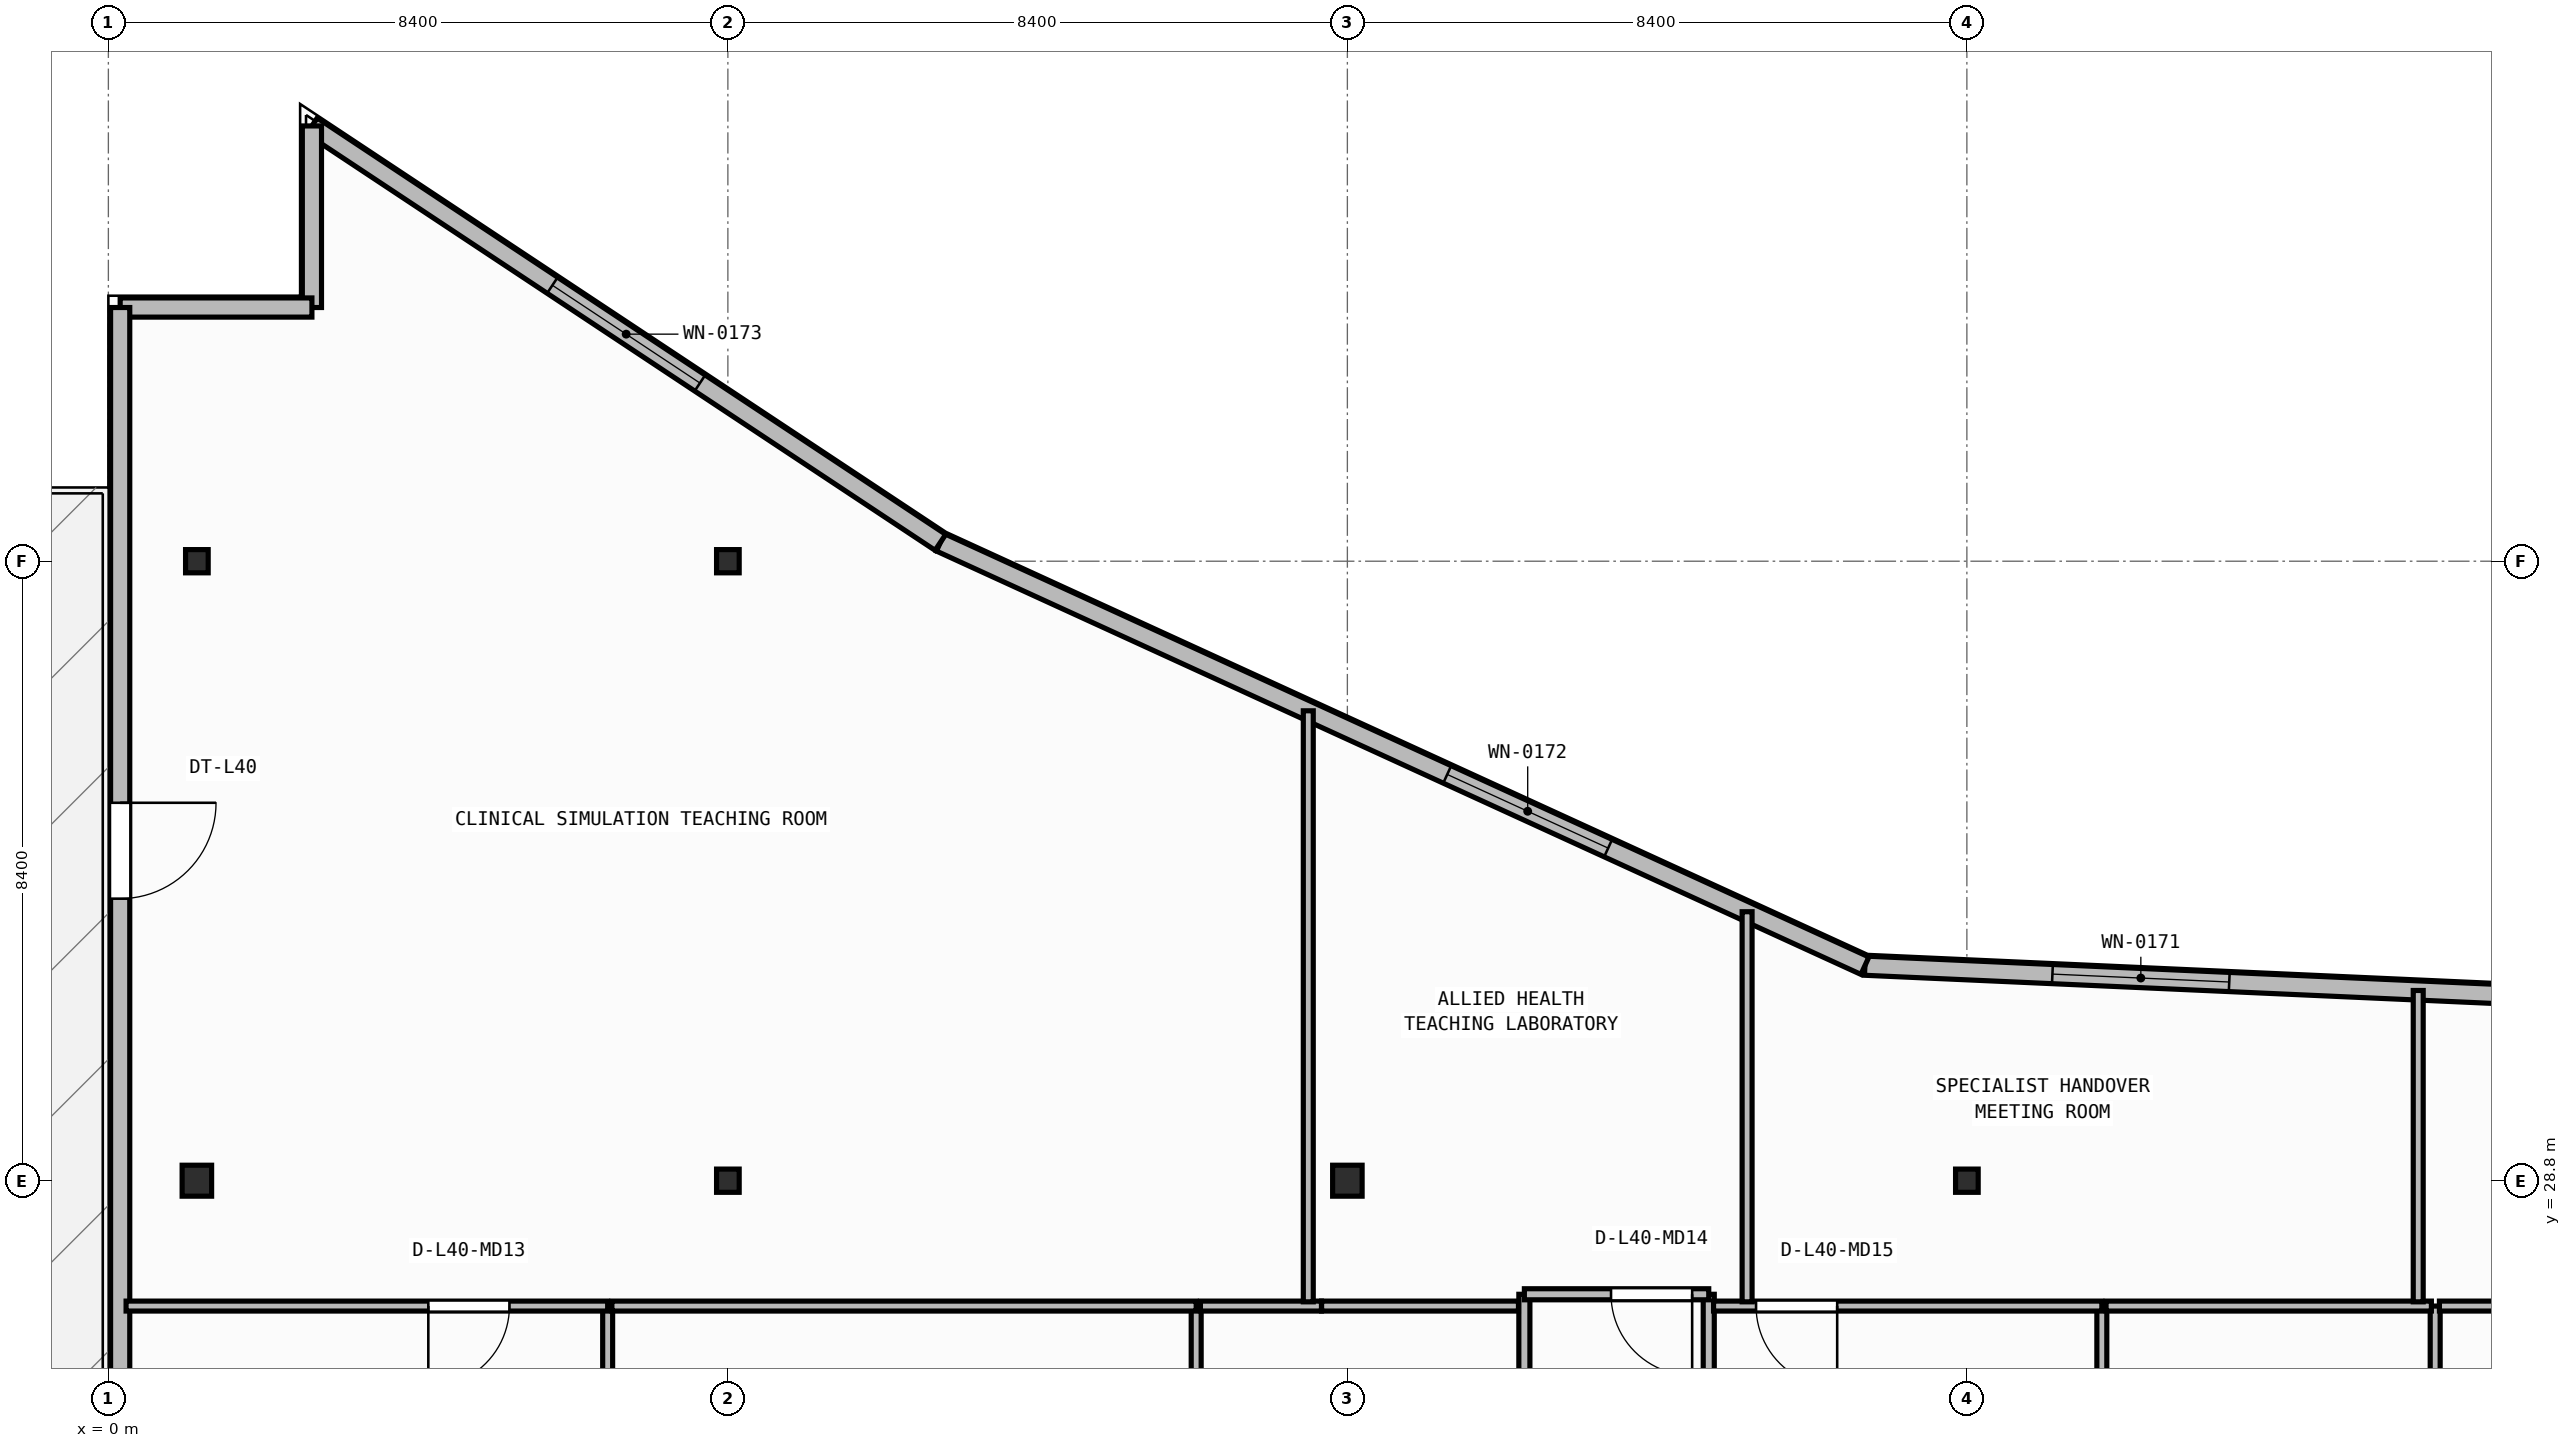
"""IFC4 building model, lengths in metres.
Left out: names, types, materials, properties, quantities, classifications, styles, units other than length and angle.
Written with IfcOpenShell. Run it as: python <this file> out.ifc"""

import sys

from ifc_helpers import new_model, si_unit, direction, frame, frame_2d, origin, origin_2d, place, context, subcontext, project, spatial, rectangle, i_section, extrude, element, fill, save


model = new_model("IFC4")
c1 = context("Model", 3, precision=1e-05, world=origin(), true_north=direction((0.0, 1.0)))
c2 = subcontext(c1, "Body", "Model", "MODEL_VIEW")
j1 = project(units=[si_unit("LENGTHUNIT", "METRE"), si_unit("PLANEANGLEUNIT", "RADIAN")], contexts=[c1])
p1 = place(None, origin())
s1 = spatial("IfcSite", under=j1, at=p1, CompositionType="ELEMENT")
p2 = place(p1, origin())
s2 = spatial("IfcBuilding", under=s1, at=p2, CompositionType="ELEMENT")
p3 = place(p2, frame((0.0, 0.0, 162.6)))
s3 = spatial("IfcBuildingStorey", under=s2, at=p3, CompositionType="ELEMENT", Elevation=162.6)
p4 = place(p3, frame((1.2, 28.8, 0.0), z_axis=(0.0, 0.0, 1.0), x_axis=(1.0, 0.0, 0.0)))
e1 = element("IfcColumn", 1, at=p4, inside=s3, PredefinedType="COLUMN", context=c2, shape_type="SweptSolid", body=[
    extrude(i_section(OverallWidth=0.4, OverallDepth=0.42, WebThickness=0.025, FlangeThickness=0.04, at=origin_2d()), origin(), (0.0, 0.0, 1.0), 3.95),
])
p5 = place(p3, frame((8.4, 28.8, 0.0), z_axis=(0.0, 0.0, 1.0), x_axis=(1.0, 0.0, 0.0)))
e2 = element("IfcColumn", 2, at=p5, inside=s3, PredefinedType="COLUMN", context=c2, shape_type="SweptSolid", body=[
    extrude(i_section(OverallWidth=0.307, OverallDepth=0.315, WebThickness=0.012, FlangeThickness=0.019, FilletRadius=0.017, at=origin_2d()), origin(), (0.0, 0.0, 1.0), 3.95),
])
p6 = place(p3, frame((16.8, 28.8, 0.0), z_axis=(0.0, 0.0, 1.0), x_axis=(1.0, 0.0, 0.0)))
e3 = element("IfcColumn", 3, at=p6, inside=s3, PredefinedType="COLUMN", context=c2, shape_type="SweptSolid", body=[
    extrude(i_section(OverallWidth=0.4, OverallDepth=0.42, WebThickness=0.025, FlangeThickness=0.04, at=origin_2d()), origin(), (0.0, 0.0, 1.0), 3.95),
])
for number, where, z_axis, x_axis in (
    (4, (25.2, 28.8, 0.0), (0.0, 0.0, 1.0), (1.0, 0.0, 0.0)),
    (5, (1.2, 37.2, 0.0), (0.0, 0.0, 1.0), (1.0, 0.0, 0.0)),
    (6, (8.4, 37.2, 0.0), (0.0, 0.0, 1.0), (1.0, 0.0, 0.0)),
):
    element("IfcColumn", number, at=place(p3, frame(where, z_axis=z_axis, x_axis=x_axis)), inside=s3, PredefinedType="COLUMN", context=c2, shape_type="SweptSolid", body=[
        extrude(i_section(OverallWidth=0.307, OverallDepth=0.315, WebThickness=0.012, FlangeThickness=0.019, FilletRadius=0.017, at=origin_2d()), origin(), (0.0, 0.0, 1.0), 3.95),
    ])
p7 = place(p3, frame((38.63, 31.052, 0.0), z_axis=(0.0, 0.0, 1.0), x_axis=(-0.998996592956, 0.044786239663, 0.0)))
e7 = element("IfcWall", 7, at=p7, inside=s3, PredefinedType="STANDARD", context=c2, shape_type="SweptSolid", body=[
    extrude(rectangle(XDim=14.827, YDim=0.26, at=frame_2d((7.414, 0.0))), origin(), (0.0, 0.0, 1.0), 3.71),
])
p8 = place(p7, frame((9.882, 0.0, 0.9)))
e8 = element("IfcOpeningElement", 8, at=p8, cuts=e7, PredefinedType="OPENING", context=c2, shape_type="SweptSolid", body=[
    extrude(rectangle(XDim=2.4, YDim=1.65, at=frame_2d((1.2, 0.825))), frame((0.0, 0.14, 0.0), z_axis=(0.0, -1.0, 0.0), x_axis=(1.0, 0.0, 0.0)), (0.0, 0.0, 1.0), 0.28),
])
p9 = place(p3, frame((23.818, 31.716, 0.0), z_axis=(0.0, 0.0, 1.0), x_axis=(-0.909209527513, 0.416338846471, 0.0)))
e9 = element("IfcWall", 9, at=p9, inside=s3, PredefinedType="STANDARD", context=c2, shape_type="SweptSolid", body=[
    extrude(rectangle(XDim=13.787, YDim=0.26, at=frame_2d((6.894, 0.0))), origin(), (0.0, 0.0, 1.0), 3.71),
])
p10 = place(p9, frame((3.829, 0.0, 0.9)))
e10 = element("IfcOpeningElement", 10, at=p10, cuts=e9, PredefinedType="OPENING", context=c2, shape_type="SweptSolid", body=[
    extrude(rectangle(XDim=2.4, YDim=1.65, at=frame_2d((1.2, 0.825))), frame((0.0, 0.14, 0.0), z_axis=(0.0, -1.0, 0.0), x_axis=(1.0, 0.0, 0.0)), (0.0, 0.0, 1.0), 0.28),
])
p11 = place(p3, frame((11.282, 37.456, 0.0), z_axis=(0.0, 0.0, 1.0), x_axis=(-0.833630474253, 0.552322580017, 0.0)))
e11 = element("IfcWall", 11, at=p11, inside=s3, PredefinedType="STANDARD", context=c2, shape_type="SweptSolid", body=[
    extrude(rectangle(XDim=10.223, YDim=0.26, at=frame_2d((5.111, 0.0))), origin(), (0.0, 0.0, 1.0), 3.71),
])
p12 = place(p11, frame((3.911, 0.0, 0.9)))
e12 = element("IfcOpeningElement", 12, at=p12, cuts=e11, PredefinedType="OPENING", context=c2, shape_type="SweptSolid", body=[
    extrude(rectangle(XDim=2.4, YDim=1.65, at=frame_2d((1.2, 0.825))), frame((0.0, 0.14, 0.0), z_axis=(0.0, -1.0, 0.0), x_axis=(1.0, 0.0, 0.0)), (0.0, 0.0, 1.0), 0.28),
])
p13 = place(p3, frame((2.76, 43.102, 0.0), z_axis=(0.0, 0.0, 1.0), x_axis=(0.0, -1.0, 0.0)))
e13 = element("IfcWall", 13, at=p13, inside=s3, PredefinedType="STANDARD", context=c2, shape_type="SweptSolid", body=[
    extrude(rectangle(XDim=2.462, YDim=0.26, at=frame_2d((1.231, 0.0))), origin(), (0.0, 0.0, 1.0), 3.71),
])
p14 = place(p3, frame((2.76, 40.64, 0.0), z_axis=(0.0, 0.0, 1.0), x_axis=(-1.0, 0.0, 0.0)))
e14 = element("IfcWall", 14, at=p14, inside=s3, PredefinedType="STANDARD", context=c2, shape_type="SweptSolid", body=[
    extrude(rectangle(XDim=2.6, YDim=0.26, at=frame_2d((1.3, 0.0))), origin(), (0.0, 0.0, 1.0), 3.71),
])
p15 = place(p3, frame((0.16, 40.64, 0.0), z_axis=(0.0, 0.0, 1.0), x_axis=(0.0, -1.0, 0.0)))
e15 = element("IfcWall", 15, at=p15, inside=s3, PredefinedType="STANDARD", context=c2, shape_type="SweptSolid", body=[
    extrude(rectangle(XDim=37.88, YDim=0.26, at=frame_2d((18.94, 0.0))), origin(), (0.0, 0.0, 1.0), 3.71),
])
p16 = place(p15, frame((6.716, 0.0, 0.0)))
e16 = element("IfcOpeningElement", 16, at=p16, cuts=e15, PredefinedType="OPENING", context=c2, shape_type="SweptSolid", body=[
    extrude(rectangle(XDim=1.3, YDim=2.15, at=frame_2d((0.65, 1.075))), frame((0.0, 0.14, 0.0), z_axis=(0.0, -1.0, 0.0), x_axis=(1.0, 0.0, 0.0)), (0.0, 0.0, 1.0), 0.28),
])
p17 = place(p3, frame((19.2, 27.26, 0.0), z_axis=(0.0, 0.0, 1.0), x_axis=(0.0, -1.0, 0.0)))
e17 = element("IfcWall", 17, at=p17, inside=s3, PredefinedType="PARTITIONING", context=c2, shape_type="SweptSolid", body=[
    extrude(rectangle(XDim=6.482, YDim=0.15, at=frame_2d((3.241, 0.0))), origin(), (0.0, 0.0, 1.0), 3.71),
])
p18 = place(p17, frame((2.068, 0.0, 0.0)))
e18 = element("IfcOpeningElement", 18, at=p18, cuts=e17, PredefinedType="OPENING", context=c2, shape_type="SweptSolid", body=[
    extrude(rectangle(XDim=1.1, YDim=2.1, at=frame_2d((0.55, 1.05))), frame((0.0, 0.085, 0.0), z_axis=(0.0, -1.0, 0.0), x_axis=(1.0, 0.0, 0.0)), (0.0, 0.0, 1.0), 0.17),
])
p19 = place(p3, frame((21.7, 23.784, 0.0), z_axis=(0.0, 0.0, 1.0), x_axis=(0.0, 1.0, 0.0)))
e19 = element("IfcWall", 19, at=p19, inside=s3, PredefinedType="PARTITIONING", context=c2, shape_type="SweptSolid", body=[
    extrude(rectangle(XDim=3.476, YDim=0.15, at=frame_2d((1.738, 0.0))), origin(), (0.0, 0.0, 1.0), 3.71),
])
p20 = place(p19, frame((1.188, 0.0, 0.0)))
e20 = element("IfcOpeningElement", 20, at=p20, cuts=e19, PredefinedType="OPENING", context=c2, shape_type="SweptSolid", body=[
    extrude(rectangle(XDim=1.1, YDim=2.1, at=frame_2d((0.55, 1.05))), frame((0.0, 0.085, 0.0), z_axis=(0.0, -1.0, 0.0), x_axis=(1.0, 0.0, 0.0)), (0.0, 0.0, 1.0), 0.17),
])
p21 = place(p3, frame((21.7, 27.26, 0.0), z_axis=(0.0, 0.0, 1.0), x_axis=(-1.0, 0.0, 0.0)))
e21 = element("IfcWall", 21, at=p21, inside=s3, PredefinedType="PARTITIONING", context=c2, shape_type="SweptSolid", body=[
    extrude(rectangle(XDim=2.5, YDim=0.15, at=frame_2d((1.25, 0.0))), origin(), (0.0, 0.0, 1.0), 3.71),
])
p22 = place(p21, frame((0.225, 0.0, 0.0)))
e22 = element("IfcOpeningElement", 22, at=p22, cuts=e21, PredefinedType="OPENING", context=c2, shape_type="SweptSolid", body=[
    extrude(rectangle(XDim=1.1, YDim=2.1, at=frame_2d((0.55, 1.05))), frame((0.0, 0.085, 0.0), z_axis=(0.0, -1.0, 0.0), x_axis=(1.0, 0.0, 0.0)), (0.0, 0.0, 1.0), 0.17),
])
p23 = place(p3, frame((6.77, 20.607, 0.0), z_axis=(0.0, 0.0, 1.0), x_axis=(0.0, 1.0, 0.0)))
e23 = element("IfcWall", 23, at=p23, inside=s3, PredefinedType="PARTITIONING", context=c2, shape_type="SweptSolid", body=[
    extrude(rectangle(XDim=6.493, YDim=0.135, at=frame_2d((3.246, 0.0))), origin(), (0.0, 0.0, 1.0), 3.71),
])
p24 = place(p3, frame((6.77, 27.1, 0.0), z_axis=(0.0, 0.0, 1.0), x_axis=(-1.0, 0.0, 0.0)))
e24 = element("IfcWall", 24, at=p24, inside=s3, PredefinedType="PARTITIONING", context=c2, shape_type="SweptSolid", body=[
    extrude(rectangle(XDim=6.53, YDim=0.135, at=frame_2d((3.265, 0.0))), origin(), (0.0, 0.0, 1.0), 3.71),
])
p25 = place(p24, frame((1.332, 0.0, 0.0)))
e25 = element("IfcOpeningElement", 25, at=p25, cuts=e24, PredefinedType="OPENING", context=c2, shape_type="SweptSolid", body=[
    extrude(rectangle(XDim=1.1, YDim=2.1, at=frame_2d((0.55, 1.05))), frame((0.0, 0.077, 0.0), z_axis=(0.0, -1.0, 0.0), x_axis=(1.0, 0.0, 0.0)), (0.0, 0.0, 1.0), 0.155),
])
p26 = place(p3, frame((14.75, 20.607, 0.0), z_axis=(0.0, 0.0, 1.0), x_axis=(0.0, 1.0, 0.0)))
e26 = element("IfcWall", 26, at=p26, inside=s3, PredefinedType="PARTITIONING", context=c2, shape_type="SweptSolid", body=[
    extrude(rectangle(XDim=6.493, YDim=0.135, at=frame_2d((3.246, 0.0))), origin(), (0.0, 0.0, 1.0), 3.71),
])
p27 = place(p3, frame((14.75, 27.1, 0.0), z_axis=(0.0, 0.0, 1.0), x_axis=(-1.0, 0.0, 0.0)))
e27 = element("IfcWall", 27, at=p27, inside=s3, PredefinedType="PARTITIONING", context=c2, shape_type="SweptSolid", body=[
    extrude(rectangle(XDim=7.923, YDim=0.135, at=frame_2d((3.961, 0.0))), origin(), (0.0, 0.0, 1.0), 3.71),
])
p28 = place(p3, frame((16.448, 27.1, 0.0), z_axis=(0.0, 0.0, 1.0), x_axis=(-1.0, 0.0, 0.0)))
e28 = element("IfcWall", 28, at=p28, inside=s3, PredefinedType="PARTITIONING", context=c2, shape_type="SweptSolid", body=[
    extrude(rectangle(XDim=1.641, YDim=0.135, at=frame_2d((0.82, 0.0))), origin(), (0.0, 0.0, 1.0), 3.71),
])
p29 = place(p3, frame((19.12, 27.1, 0.0), z_axis=(0.0, 0.0, 1.0), x_axis=(-1.0, 0.0, 0.0)))
e29 = element("IfcWall", 29, at=p29, inside=s3, PredefinedType="PARTITIONING", context=c2, shape_type="SweptSolid", body=[
    extrude(rectangle(XDim=2.67, YDim=0.135, at=frame_2d((1.335, 0.0))), origin(), (0.0, 0.0, 1.0), 3.71),
])
p30 = place(p3, frame((27.03, 23.802, 0.0), z_axis=(0.0, 0.0, 1.0), x_axis=(0.0, 1.0, 0.0)))
e30 = element("IfcWall", 30, at=p30, inside=s3, PredefinedType="PARTITIONING", context=c2, shape_type="SweptSolid", body=[
    extrude(rectangle(XDim=3.298, YDim=0.135, at=frame_2d((1.649, 0.0))), origin(), (0.0, 0.0, 1.0), 3.71),
])
p31 = place(p3, frame((27.03, 27.1, 0.0), z_axis=(0.0, 0.0, 1.0), x_axis=(-1.0, 0.0, 0.0)))
e31 = element("IfcWall", 31, at=p31, inside=s3, PredefinedType="PARTITIONING", context=c2, shape_type="SweptSolid", body=[
    extrude(rectangle(XDim=5.265, YDim=0.135, at=frame_2d((2.633, 0.0))), origin(), (0.0, 0.0, 1.0), 3.71),
])
p32 = place(p31, frame((3.588, 0.0, 0.0)))
e32 = element("IfcOpeningElement", 32, at=p32, cuts=e31, PredefinedType="OPENING", context=c2, shape_type="SweptSolid", body=[
    extrude(rectangle(XDim=1.1, YDim=2.1, at=frame_2d((0.55, 1.05))), frame((0.0, 0.077, 0.0), z_axis=(0.0, -1.0, 0.0), x_axis=(1.0, 0.0, 0.0)), (0.0, 0.0, 1.0), 0.155),
])
p33 = place(p3, frame((31.55, 23.802, 0.0), z_axis=(0.0, 0.0, 1.0), x_axis=(0.0, 1.0, 0.0)))
e33 = element("IfcWall", 33, at=p33, inside=s3, PredefinedType="PARTITIONING", context=c2, shape_type="SweptSolid", body=[
    extrude(rectangle(XDim=3.298, YDim=0.135, at=frame_2d((1.649, 0.0))), origin(), (0.0, 0.0, 1.0), 3.71),
])
p34 = place(p3, frame((31.499, 27.1, 0.0), z_axis=(0.0, 0.0, 1.0), x_axis=(-1.0, 0.0, 0.0)))
e34 = element("IfcWall", 34, at=p34, inside=s3, PredefinedType="PARTITIONING", context=c2, shape_type="SweptSolid", body=[
    extrude(rectangle(XDim=4.411, YDim=0.135, at=frame_2d((2.206, 0.0))), origin(), (0.0, 0.0, 1.0), 3.71),
])
p35 = place(p3, frame((36.46, 27.1, 0.0), z_axis=(0.0, 0.0, 1.0), x_axis=(-1.0, 0.0, 0.0)))
e35 = element("IfcWall", 35, at=p35, inside=s3, PredefinedType="PARTITIONING", context=c2, shape_type="SweptSolid", body=[
    extrude(rectangle(XDim=4.853, YDim=0.135, at=frame_2d((2.426, 0.0))), origin(), (0.0, 0.0, 1.0), 3.71),
])
p36 = place(p35, frame((0.284, 0.0, 0.0)))
e36 = element("IfcOpeningElement", 36, at=p36, cuts=e35, PredefinedType="OPENING", context=c2, shape_type="SweptSolid", body=[
    extrude(rectangle(XDim=1.1, YDim=2.1, at=frame_2d((0.55, 1.05))), frame((0.0, 0.077, 0.0), z_axis=(0.0, -1.0, 0.0), x_axis=(1.0, 0.0, 0.0)), (0.0, 0.0, 1.0), 0.155),
])
p37 = place(p3, frame((16.27, 27.157, 0.0), z_axis=(0.0, 0.0, 1.0), x_axis=(0.0, 1.0, 0.0)))
e37 = element("IfcWall", 37, at=p37, inside=s3, PredefinedType="PARTITIONING", context=c2, shape_type="SweptSolid", body=[
    extrude(rectangle(XDim=8.014, YDim=0.135, at=frame_2d((4.007, 0.0))), origin(), (0.0, 0.0, 1.0), 3.71),
])
p38 = place(p3, frame((22.22, 27.157, 0.0), z_axis=(0.0, 0.0, 1.0), x_axis=(0.0, 1.0, 0.0)))
e38 = element("IfcWall", 38, at=p38, inside=s3, PredefinedType="PARTITIONING", context=c2, shape_type="SweptSolid", body=[
    extrude(rectangle(XDim=5.29, YDim=0.135, at=frame_2d((2.645, 0.0))), origin(), (0.0, 0.0, 1.0), 3.71),
])
p39 = place(p3, frame((31.32, 27.157, 0.0), z_axis=(0.0, 0.0, 1.0), x_axis=(0.0, 1.0, 0.0)))
e39 = element("IfcWall", 39, at=p39, inside=s3, PredefinedType="PARTITIONING", context=c2, shape_type="SweptSolid", body=[
    extrude(rectangle(XDim=4.222, YDim=0.135, at=frame_2d((2.111, 0.0))), origin(), (0.0, 0.0, 1.0), 3.71),
])
p40 = place(p8, origin())
e40 = element("IfcWindow", 40, at=p40, inside=s3, PartitioningType="SINGLE_PANEL", PredefinedType="WINDOW", context=c2, shape_type="SweptSolid", body=[
    extrude(rectangle(XDim=2.4, YDim=1.65, at=frame_2d((1.2, 0.825))), frame((0.0, 0.03, 0.0), z_axis=(0.0, -1.0, 0.0), x_axis=(1.0, 0.0, 0.0)), (0.0, 0.0, 1.0), 0.06),
])
fill(e8, e40)
p41 = place(p10, origin())
e41 = element("IfcWindow", 41, at=p41, inside=s3, PartitioningType="SINGLE_PANEL", PredefinedType="WINDOW", context=c2, shape_type="SweptSolid", body=[
    extrude(rectangle(XDim=2.4, YDim=1.65, at=frame_2d((1.2, 0.825))), frame((0.0, 0.03, 0.0), z_axis=(0.0, -1.0, 0.0), x_axis=(1.0, 0.0, 0.0)), (0.0, 0.0, 1.0), 0.06),
])
fill(e10, e41)
p42 = place(p12, origin())
e42 = element("IfcWindow", 42, at=p42, inside=s3, PartitioningType="SINGLE_PANEL", PredefinedType="WINDOW", context=c2, shape_type="SweptSolid", body=[
    extrude(rectangle(XDim=2.4, YDim=1.65, at=frame_2d((1.2, 0.825))), frame((0.0, 0.03, 0.0), z_axis=(0.0, -1.0, 0.0), x_axis=(1.0, 0.0, 0.0)), (0.0, 0.0, 1.0), 0.06),
])
fill(e12, e42)
p43 = place(p16, origin())
e43 = element("IfcDoor", 43, at=p43, inside=s3, OperationType="SINGLE_SWING_LEFT", PredefinedType="DOOR", context=c2, shape_type="SweptSolid", body=[
    extrude(rectangle(XDim=1.3, YDim=2.15, at=frame_2d((0.65, 1.075))), frame((0.0, 0.025, 0.0), z_axis=(0.0, -1.0, 0.0), x_axis=(1.0, 0.0, 0.0)), (0.0, 0.0, 1.0), 0.05),
])
fill(e16, e43)
p44 = place(p22, origin())
e44 = element("IfcDoor", 44, at=p44, inside=s3, OperationType="SINGLE_SWING_LEFT", PredefinedType="DOOR", context=c2, shape_type="SweptSolid", body=[
    extrude(rectangle(XDim=1.1, YDim=2.1, at=frame_2d((0.55, 1.05))), frame((0.0, 0.025, 0.0), z_axis=(0.0, -1.0, 0.0), x_axis=(1.0, 0.0, 0.0)), (0.0, 0.0, 1.0), 0.05),
])
fill(e22, e44)
p45 = place(p25, origin())
e45 = element("IfcDoor", 45, at=p45, inside=s3, OperationType="SINGLE_SWING_RIGHT", PredefinedType="DOOR", context=c2, shape_type="SweptSolid", body=[
    extrude(rectangle(XDim=1.1, YDim=2.1, at=frame_2d((0.55, 1.05))), frame((0.0, 0.025, 0.0), z_axis=(0.0, -1.0, 0.0), x_axis=(1.0, 0.0, 0.0)), (0.0, 0.0, 1.0), 0.05),
])
fill(e25, e45)
p46 = place(p32, origin())
e46 = element("IfcDoor", 46, at=p46, inside=s3, OperationType="SINGLE_SWING_LEFT", PredefinedType="DOOR", context=c2, shape_type="SweptSolid", body=[
    extrude(rectangle(XDim=1.1, YDim=2.1, at=frame_2d((0.55, 1.05))), frame((0.0, 0.025, 0.0), z_axis=(0.0, -1.0, 0.0), x_axis=(1.0, 0.0, 0.0)), (0.0, 0.0, 1.0), 0.05),
])
fill(e32, e46)
save(model, sys.argv[1])
